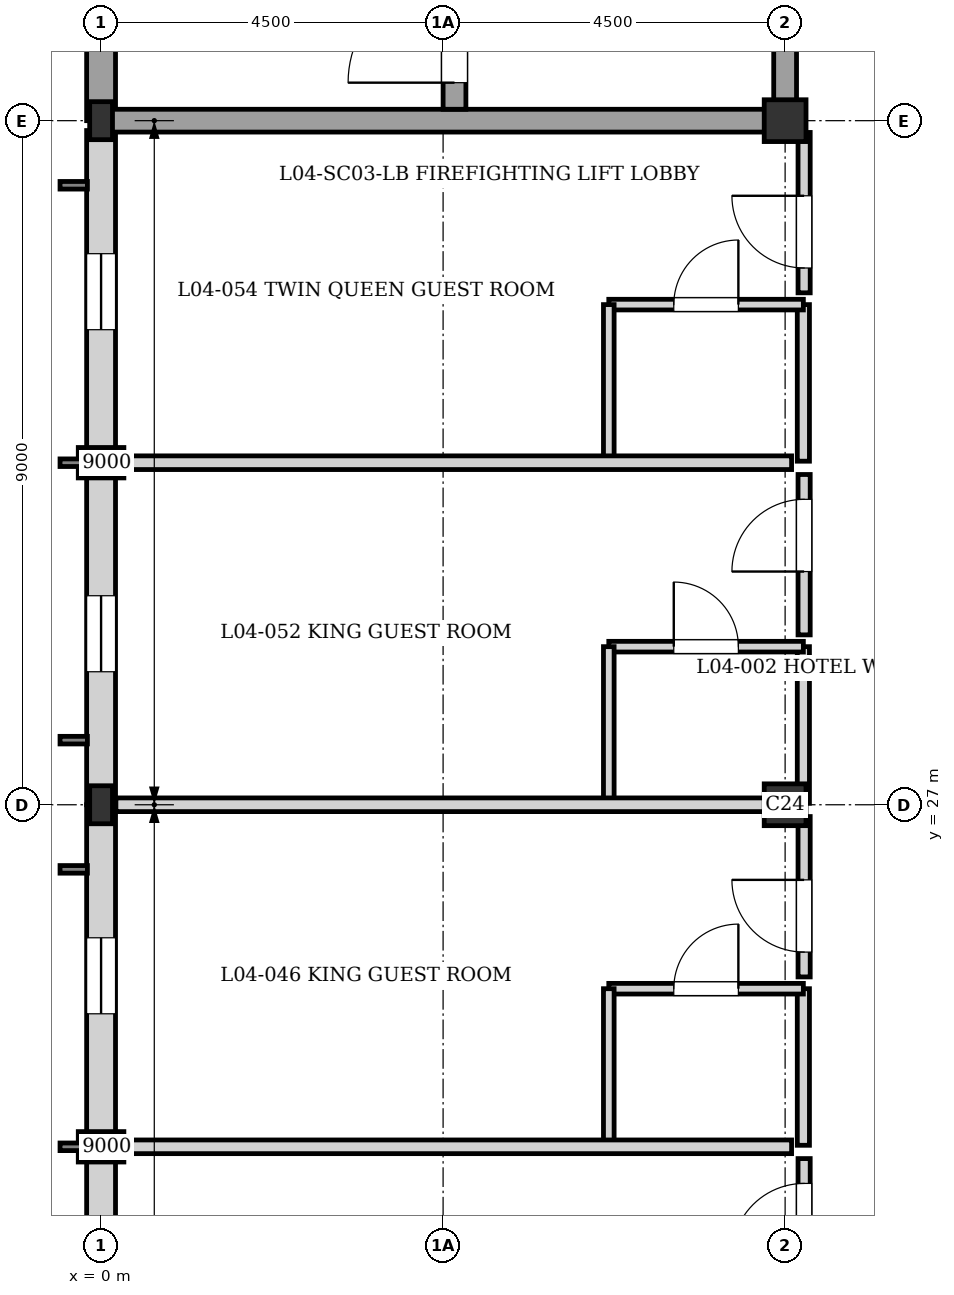
"""IFC4 building model, lengths in metres.
Left out: names, types, materials, properties, quantities, classifications, styles, units other than length and angle.
Written with IfcOpenShell. Run it as: python <this file> out.ifc"""

import sys

from ifc_helpers import new_model, si_unit, direction, frame, frame_2d, origin, origin_2d, place, context, subcontext, project, spatial, rectangle, i_section, extrude, element, fill, save


model = new_model("IFC4")
c1 = context("Model", 3, precision=1e-05, world=origin(), true_north=direction((0.0, 1.0)))
c2 = subcontext(c1, "Body", "Model", "MODEL_VIEW")
j1 = project(units=[si_unit("LENGTHUNIT", "METRE"), si_unit("PLANEANGLEUNIT", "RADIAN")], contexts=[c1])
p1 = place(None, origin())
s1 = spatial("IfcSite", under=j1, at=p1, CompositionType="ELEMENT")
p2 = place(p1, origin())
s2 = spatial("IfcBuilding", under=s1, at=p2, CompositionType="ELEMENT")
p3 = place(p2, frame((0.0, 0.0, 14.56)))
s3 = spatial("IfcBuildingStorey", under=s2, at=p3, CompositionType="ELEMENT", Elevation=14.56)
for number, where, z_axis, x_axis in (
    (1, (0.0, 27.0, 0.0), (0.0, 0.0, 1.0), (1.0, 0.0, 0.0)),
    (2, (0.0, 36.0, 0.0), (0.0, 0.0, 1.0), (1.0, 0.0, 0.0)),
):
    element("IfcColumn", number, at=place(p3, frame(where, z_axis=z_axis, x_axis=x_axis)), inside=s3, PredefinedType="COLUMN", context=c2, shape_type="SweptSolid", body=[
        extrude(i_section(OverallWidth=0.3, OverallDepth=0.5, WebThickness=0.014, FlangeThickness=0.028, at=origin_2d()), origin(), (0.0, 0.0, 1.0), 3.04),
    ])
for number, where, z_axis, x_axis in (
    (3, (9.0, 27.0, 0.0), (0.0, 0.0, 1.0), (1.0, 0.0, 0.0)),
    (4, (9.0, 36.0, 0.0), (0.0, 0.0, 1.0), (1.0, 0.0, 0.0)),
):
    element("IfcColumn", number, at=place(p3, frame(where, z_axis=z_axis, x_axis=x_axis)), inside=s3, PredefinedType="COLUMN", context=c2, shape_type="SweptSolid", body=[
        extrude(rectangle(XDim=0.55, YDim=0.55, at=origin_2d()), origin(), (0.0, 0.0, 1.0), 3.04),
    ])
for number, where, z_axis, x_axis in (
    (5, (0.0, 22.5, 0.0), (0.0, 0.0, 1.0), (0.0, 1.0, 0.0)),
    (6, (0.0, 31.5, 0.0), (0.0, 0.0, 1.0), (0.0, 1.0, 0.0)),
):
    element("IfcColumn", number, at=place(p3, frame(where, z_axis=z_axis, x_axis=x_axis)), inside=s3, PredefinedType="PILASTER", context=c2, shape_type="SweptSolid", body=[
        extrude(rectangle(XDim=0.4, YDim=0.6, at=origin_2d()), origin(), (0.0, 0.0, 1.0), 3.04),
    ])
p4 = place(p3, frame((0.0, 18.0, 0.0), z_axis=(0.0, 0.0, 1.0), x_axis=(0.0, 1.0, 0.0)))
e7 = element("IfcWall", 7, at=p4, inside=s3, PredefinedType="SOLIDWALL", context=c2, shape_type="SweptSolid", body=[
    extrude(rectangle(XDim=9.0, YDim=0.38, at=frame_2d((4.5, 0.0))), origin(), (0.0, 0.0, 1.0), 2.48),
])
p5 = place(p4, frame((1.75, 0.0, 0.35)))
e8 = element("IfcOpeningElement", 8, at=p5, cuts=e7, PredefinedType="OPENING", context=c2, shape_type="SweptSolid", body=[
    extrude(rectangle(XDim=1.0, YDim=1.6, at=frame_2d((0.5, 0.8))), frame((0.0, 0.2, 0.0), z_axis=(0.0, -1.0, 0.0), x_axis=(1.0, 0.0, 0.0)), (0.0, 0.0, 1.0), 0.4),
])
p6 = place(p4, frame((6.25, 0.0, 0.35)))
e9 = element("IfcOpeningElement", 9, at=p6, cuts=e7, PredefinedType="OPENING", context=c2, shape_type="SweptSolid", body=[
    extrude(rectangle(XDim=1.0, YDim=1.6, at=frame_2d((0.5, 0.8))), frame((0.0, 0.2, 0.0), z_axis=(0.0, -1.0, 0.0), x_axis=(1.0, 0.0, 0.0)), (0.0, 0.0, 1.0), 0.4),
])
p7 = place(p3, frame((0.0, 27.0, 0.0), z_axis=(0.0, 0.0, 1.0), x_axis=(0.0, 1.0, 0.0)))
e10 = element("IfcWall", 10, at=p7, inside=s3, PredefinedType="SOLIDWALL", context=c2, shape_type="SweptSolid", body=[
    extrude(rectangle(XDim=8.87, YDim=0.38, at=frame_2d((4.435, 0.0))), origin(), (0.0, 0.0, 1.0), 2.42),
])
p8 = place(p7, frame((1.75, 0.0, 0.35)))
e11 = element("IfcOpeningElement", 11, at=p8, cuts=e10, PredefinedType="OPENING", context=c2, shape_type="SweptSolid", body=[
    extrude(rectangle(XDim=1.0, YDim=1.6, at=frame_2d((0.5, 0.8))), frame((0.0, 0.2, 0.0), z_axis=(0.0, -1.0, 0.0), x_axis=(1.0, 0.0, 0.0)), (0.0, 0.0, 1.0), 0.4),
])
p9 = place(p7, frame((6.25, 0.0, 0.35)))
e12 = element("IfcOpeningElement", 12, at=p9, cuts=e10, PredefinedType="OPENING", context=c2, shape_type="SweptSolid", body=[
    extrude(rectangle(XDim=1.0, YDim=1.6, at=frame_2d((0.5, 0.8))), frame((0.0, 0.2, 0.0), z_axis=(0.0, -1.0, 0.0), x_axis=(1.0, 0.0, 0.0)), (0.0, 0.0, 1.0), 0.4),
])
p10 = place(p3, frame((0.0, 36.0, 0.0), z_axis=(0.0, 0.0, 1.0), x_axis=(0.0, 1.0, 0.0)))
e13 = element("IfcWall", 13, at=p10, inside=s3, PredefinedType="SOLIDWALL", context=c2, shape_type="SweptSolid", body=[
    extrude(rectangle(XDim=9.0, YDim=0.38, at=frame_2d((4.5, 0.0))), origin(), (0.0, 0.0, 1.0), 2.82),
])
p11 = place(p3, frame((0.0, 36.0, 0.0), z_axis=(0.0, 0.0, 1.0), x_axis=(1.0, 0.0, 0.0)))
e14 = element("IfcWall", 14, at=p11, inside=s3, PredefinedType="SHEAR", context=c2, shape_type="SweptSolid", body=[
    extrude(rectangle(XDim=9.0, YDim=0.3, at=frame_2d((4.5, 0.0))), origin(), (0.0, 0.0, 1.0), 2.82),
])
p12 = place(p3, frame((9.0, 36.0, 0.0), z_axis=(0.0, 0.0, 1.0), x_axis=(0.0, 1.0, 0.0)))
e15 = element("IfcWall", 15, at=p12, inside=s3, PredefinedType="SHEAR", context=c2, shape_type="SweptSolid", body=[
    extrude(rectangle(XDim=9.0, YDim=0.3, at=frame_2d((4.5, 0.0))), origin(), (0.0, 0.0, 1.0), 2.82),
])
p13 = place(p12, frame((2.05, 0.0, 0.0)))
e16 = element("IfcOpeningElement", 16, at=p13, cuts=e15, PredefinedType="OPENING", context=c2, shape_type="SweptSolid", body=[
    extrude(rectangle(XDim=1.4, YDim=2.02, at=frame_2d((0.7, 1.01))), frame((0.0, 0.16, 0.0), z_axis=(0.0, -1.0, 0.0), x_axis=(1.0, 0.0, 0.0)), (0.0, 0.0, 1.0), 0.32),
])
p14 = place(p3, frame((4.65, 36.15, 0.0), z_axis=(0.0, 0.0, 1.0), x_axis=(0.0, 1.0, 0.0)))
e17 = element("IfcWall", 17, at=p14, inside=s3, PredefinedType="SHEAR", context=c2, shape_type="SweptSolid", body=[
    extrude(rectangle(XDim=8.7, YDim=0.3, at=frame_2d((4.35, 0.0))), origin(), (0.0, 0.0, 1.0), 2.82),
])
p15 = place(p14, frame((0.35, 0.0, 0.0)))
e18 = element("IfcOpeningElement", 18, at=p15, cuts=e17, PredefinedType="OPENING", context=c2, shape_type="SweptSolid", body=[
    extrude(rectangle(XDim=1.4, YDim=2.02, at=frame_2d((0.7, 1.01))), frame((0.0, 0.16, 0.0), z_axis=(0.0, -1.0, 0.0), x_axis=(1.0, 0.0, 0.0)), (0.0, 0.0, 1.0), 0.32),
])
p16 = place(p3, frame((9.24, 22.52, 0.0), z_axis=(0.0, 0.0, 1.0), x_axis=(0.0, 1.0, 0.0)))
e19 = element("IfcWall", 19, at=p16, inside=s3, PredefinedType="PARTITIONING", context=c2, shape_type="SweptSolid", body=[
    extrude(rectangle(XDim=2.06, YDim=0.16, at=frame_2d((1.03, 0.0))), origin(), (0.0, 0.0, 1.0), 2.82),
])
p17 = place(p3, frame((6.68, 24.58, 0.0), z_axis=(0.0, 0.0, 1.0), x_axis=(1.0, 0.0, 0.0)))
e20 = element("IfcWall", 20, at=p17, inside=s3, PredefinedType="PLUMBINGWALL", context=c2, shape_type="SweptSolid", body=[
    extrude(rectangle(XDim=2.56, YDim=0.14, at=frame_2d((1.28, 0.0))), origin(), (0.0, 0.0, 1.0), 2.82),
])
p18 = place(p17, frame((0.855, 0.0, 0.0)))
e21 = element("IfcOpeningElement", 21, at=p18, cuts=e20, PredefinedType="OPENING", context=c2, shape_type="SweptSolid", body=[
    extrude(rectangle(XDim=0.85, YDim=2.04, at=frame_2d((0.425, 1.02))), frame((0.0, 0.08, 0.0), z_axis=(0.0, -1.0, 0.0), x_axis=(1.0, 0.0, 0.0)), (0.0, 0.0, 1.0), 0.16),
])
p19 = place(p3, frame((6.68, 22.52, 0.0), z_axis=(0.0, 0.0, 1.0), x_axis=(0.0, 1.0, 0.0)))
e22 = element("IfcWall", 22, at=p19, inside=s3, PredefinedType="PLUMBINGWALL", context=c2, shape_type="SweptSolid", body=[
    extrude(rectangle(XDim=2.06, YDim=0.14, at=frame_2d((1.03, 0.0))), origin(), (0.0, 0.0, 1.0), 2.82),
])
p20 = place(p3, frame((9.24, 27.02, 0.0), z_axis=(0.0, 0.0, 1.0), x_axis=(0.0, 1.0, 0.0)))
e23 = element("IfcWall", 23, at=p20, inside=s3, PredefinedType="PARTITIONING", context=c2, shape_type="SweptSolid", body=[
    extrude(rectangle(XDim=2.06, YDim=0.16, at=frame_2d((1.03, 0.0))), origin(), (0.0, 0.0, 1.0), 2.82),
])
p21 = place(p3, frame((6.68, 29.08, 0.0), z_axis=(0.0, 0.0, 1.0), x_axis=(1.0, 0.0, 0.0)))
e24 = element("IfcWall", 24, at=p21, inside=s3, PredefinedType="PLUMBINGWALL", context=c2, shape_type="SweptSolid", body=[
    extrude(rectangle(XDim=2.56, YDim=0.14, at=frame_2d((1.28, 0.0))), origin(), (0.0, 0.0, 1.0), 2.82),
])
p22 = place(p21, frame((0.855, 0.0, 0.0)))
e25 = element("IfcOpeningElement", 25, at=p22, cuts=e24, PredefinedType="OPENING", context=c2, shape_type="SweptSolid", body=[
    extrude(rectangle(XDim=0.85, YDim=2.04, at=frame_2d((0.425, 1.02))), frame((0.0, 0.08, 0.0), z_axis=(0.0, -1.0, 0.0), x_axis=(1.0, 0.0, 0.0)), (0.0, 0.0, 1.0), 0.16),
])
p23 = place(p3, frame((6.68, 27.02, 0.0), z_axis=(0.0, 0.0, 1.0), x_axis=(0.0, 1.0, 0.0)))
e26 = element("IfcWall", 26, at=p23, inside=s3, PredefinedType="PLUMBINGWALL", context=c2, shape_type="SweptSolid", body=[
    extrude(rectangle(XDim=2.06, YDim=0.14, at=frame_2d((1.03, 0.0))), origin(), (0.0, 0.0, 1.0), 2.82),
])
p24 = place(p3, frame((9.24, 31.52, 0.0), z_axis=(0.0, 0.0, 1.0), x_axis=(0.0, 1.0, 0.0)))
e27 = element("IfcWall", 27, at=p24, inside=s3, PredefinedType="PARTITIONING", context=c2, shape_type="SweptSolid", body=[
    extrude(rectangle(XDim=2.06, YDim=0.16, at=frame_2d((1.03, 0.0))), origin(), (0.0, 0.0, 1.0), 2.82),
])
p25 = place(p3, frame((6.68, 33.58, 0.0), z_axis=(0.0, 0.0, 1.0), x_axis=(1.0, 0.0, 0.0)))
e28 = element("IfcWall", 28, at=p25, inside=s3, PredefinedType="PLUMBINGWALL", context=c2, shape_type="SweptSolid", body=[
    extrude(rectangle(XDim=2.56, YDim=0.14, at=frame_2d((1.28, 0.0))), origin(), (0.0, 0.0, 1.0), 2.82),
])
p26 = place(p25, frame((0.855, 0.0, 0.0)))
e29 = element("IfcOpeningElement", 29, at=p26, cuts=e28, PredefinedType="OPENING", context=c2, shape_type="SweptSolid", body=[
    extrude(rectangle(XDim=0.85, YDim=2.04, at=frame_2d((0.425, 1.02))), frame((0.0, 0.08, 0.0), z_axis=(0.0, -1.0, 0.0), x_axis=(1.0, 0.0, 0.0)), (0.0, 0.0, 1.0), 0.16),
])
p27 = place(p3, frame((6.68, 31.52, 0.0), z_axis=(0.0, 0.0, 1.0), x_axis=(0.0, 1.0, 0.0)))
e30 = element("IfcWall", 30, at=p27, inside=s3, PredefinedType="PLUMBINGWALL", context=c2, shape_type="SweptSolid", body=[
    extrude(rectangle(XDim=2.06, YDim=0.14, at=frame_2d((1.03, 0.0))), origin(), (0.0, 0.0, 1.0), 2.82),
])
p28 = place(p3, frame((0.195, 22.5, 0.0), z_axis=(0.0, 0.0, 1.0), x_axis=(1.0, 0.0, 0.0)))
e31 = element("IfcWall", 31, at=p28, inside=s3, PredefinedType="PARTITIONING", context=c2, shape_type="SweptSolid", body=[
    extrude(rectangle(XDim=8.89, YDim=0.18, at=frame_2d((4.445, 0.0))), origin(), (0.0, 0.0, 1.0), 2.82),
])
p29 = place(p3, frame((0.195, 27.0, 0.0), z_axis=(0.0, 0.0, 1.0), x_axis=(1.0, 0.0, 0.0)))
e32 = element("IfcWall", 32, at=p29, inside=s3, PredefinedType="PARTITIONING", context=c2, shape_type="SweptSolid", body=[
    extrude(rectangle(XDim=8.89, YDim=0.18, at=frame_2d((4.445, 0.0))), origin(), (0.0, 0.0, 1.0), 2.39),
])
p30 = place(p3, frame((0.195, 31.5, 0.0), z_axis=(0.0, 0.0, 1.0), x_axis=(1.0, 0.0, 0.0)))
e33 = element("IfcWall", 33, at=p30, inside=s3, PredefinedType="PARTITIONING", context=c2, shape_type="SweptSolid", body=[
    extrude(rectangle(XDim=8.89, YDim=0.18, at=frame_2d((4.445, 0.0))), origin(), (0.0, 0.0, 1.0), 2.82),
])
p31 = place(p3, frame((9.25, 20.235, 0.0), z_axis=(0.0, 0.0, 1.0), x_axis=(0.0, 1.0, 0.0)))
e34 = element("IfcWall", 34, at=p31, inside=s3, PredefinedType="PARTITIONING", context=c2, shape_type="SweptSolid", body=[
    extrude(rectangle(XDim=2.11, YDim=0.16, at=frame_2d((1.055, 0.0))), origin(), (0.0, 0.0, 1.0), 2.82),
])
p32 = place(p31, frame((0.833, 0.0, 0.0)))
e35 = element("IfcOpeningElement", 35, at=p32, cuts=e34, PredefinedType="OPENING", context=c2, shape_type="SweptSolid", body=[
    extrude(rectangle(XDim=0.95, YDim=2.15, at=frame_2d((0.475, 1.075))), frame((0.0, 0.09, 0.0), z_axis=(0.0, -1.0, 0.0), x_axis=(1.0, 0.0, 0.0)), (0.0, 0.0, 1.0), 0.18),
])
p33 = place(p3, frame((9.25, 24.735, 0.0), z_axis=(0.0, 0.0, 1.0), x_axis=(0.0, 1.0, 0.0)))
e36 = element("IfcWall", 36, at=p33, inside=s3, PredefinedType="PARTITIONING", context=c2, shape_type="SweptSolid", body=[
    extrude(rectangle(XDim=2.11, YDim=0.16, at=frame_2d((1.055, 0.0))), origin(), (0.0, 0.0, 1.0), 2.82),
])
p34 = place(p33, frame((0.327, 0.0, 0.0)))
e37 = element("IfcOpeningElement", 37, at=p34, cuts=e36, PredefinedType="OPENING", context=c2, shape_type="SweptSolid", body=[
    extrude(rectangle(XDim=0.95, YDim=2.15, at=frame_2d((0.475, 1.075))), frame((0.0, 0.09, 0.0), z_axis=(0.0, -1.0, 0.0), x_axis=(1.0, 0.0, 0.0)), (0.0, 0.0, 1.0), 0.18),
])
p35 = place(p3, frame((9.25, 29.235, 0.0), z_axis=(0.0, 0.0, 1.0), x_axis=(0.0, 1.0, 0.0)))
e38 = element("IfcWall", 38, at=p35, inside=s3, PredefinedType="PARTITIONING", context=c2, shape_type="SweptSolid", body=[
    extrude(rectangle(XDim=2.11, YDim=0.16, at=frame_2d((1.055, 0.0))), origin(), (0.0, 0.0, 1.0), 2.82),
])
p36 = place(p35, frame((0.833, 0.0, 0.0)))
e39 = element("IfcOpeningElement", 39, at=p36, cuts=e38, PredefinedType="OPENING", context=c2, shape_type="SweptSolid", body=[
    extrude(rectangle(XDim=0.95, YDim=2.15, at=frame_2d((0.475, 1.075))), frame((0.0, 0.09, 0.0), z_axis=(0.0, -1.0, 0.0), x_axis=(1.0, 0.0, 0.0)), (0.0, 0.0, 1.0), 0.18),
])
p37 = place(p3, frame((9.25, 33.735, 0.0), z_axis=(0.0, 0.0, 1.0), x_axis=(0.0, 1.0, 0.0)))
e40 = element("IfcWall", 40, at=p37, inside=s3, PredefinedType="PARTITIONING", context=c2, shape_type="SweptSolid", body=[
    extrude(rectangle(XDim=2.11, YDim=0.16, at=frame_2d((1.055, 0.0))), origin(), (0.0, 0.0, 1.0), 2.82),
])
p38 = place(p37, frame((0.327, 0.0, 0.0)))
e41 = element("IfcOpeningElement", 41, at=p38, cuts=e40, PredefinedType="OPENING", context=c2, shape_type="SweptSolid", body=[
    extrude(rectangle(XDim=0.95, YDim=2.15, at=frame_2d((0.475, 1.075))), frame((0.0, 0.09, 0.0), z_axis=(0.0, -1.0, 0.0), x_axis=(1.0, 0.0, 0.0)), (0.0, 0.0, 1.0), 0.18),
])
p39 = place(p6, origin())
e42 = element("IfcWindow", 42, at=p39, inside=s3, PartitioningType="SINGLE_PANEL", PredefinedType="WINDOW", context=c2, shape_type="SweptSolid", body=[
    extrude(rectangle(XDim=1.0, YDim=1.6, at=frame_2d((0.5, 0.8))), frame((0.0, 0.03, 0.0), z_axis=(0.0, -1.0, 0.0), x_axis=(1.0, 0.0, 0.0)), (0.0, 0.0, 1.0), 0.06),
])
fill(e9, e42)
p40 = place(p8, origin())
e43 = element("IfcWindow", 43, at=p40, inside=s3, PartitioningType="SINGLE_PANEL", PredefinedType="WINDOW", context=c2, shape_type="SweptSolid", body=[
    extrude(rectangle(XDim=1.0, YDim=1.6, at=frame_2d((0.5, 0.8))), frame((0.0, 0.03, 0.0), z_axis=(0.0, -1.0, 0.0), x_axis=(1.0, 0.0, 0.0)), (0.0, 0.0, 1.0), 0.06),
])
fill(e11, e43)
p41 = place(p9, origin())
e44 = element("IfcWindow", 44, at=p41, inside=s3, PartitioningType="SINGLE_PANEL", PredefinedType="WINDOW", context=c2, shape_type="SweptSolid", body=[
    extrude(rectangle(XDim=1.0, YDim=1.6, at=frame_2d((0.5, 0.8))), frame((0.0, 0.03, 0.0), z_axis=(0.0, -1.0, 0.0), x_axis=(1.0, 0.0, 0.0)), (0.0, 0.0, 1.0), 0.06),
])
fill(e12, e44)
p42 = place(p15, origin())
e45 = element("IfcDoor", 45, at=p42, inside=s3, OperationType="SINGLE_SWING_LEFT", PredefinedType="DOOR", context=c2, shape_type="SweptSolid", body=[
    extrude(rectangle(XDim=1.4, YDim=2.02, at=frame_2d((0.7, 1.01))), frame((0.0, 0.025, 0.0), z_axis=(0.0, -1.0, 0.0), x_axis=(1.0, 0.0, 0.0)), (0.0, 0.0, 1.0), 0.05),
])
fill(e18, e45)
p43 = place(p18, origin())
e46 = element("IfcDoor", 46, at=p43, inside=s3, OperationType="SINGLE_SWING_RIGHT", PredefinedType="DOOR", context=c2, shape_type="SweptSolid", body=[
    extrude(rectangle(XDim=0.85, YDim=2.04, at=frame_2d((0.425, 1.02))), frame((0.0, 0.025, 0.0), z_axis=(0.0, -1.0, 0.0), x_axis=(1.0, 0.0, 0.0)), (0.0, 0.0, 1.0), 0.05),
])
fill(e21, e46)
p44 = place(p22, origin())
e47 = element("IfcDoor", 47, at=p44, inside=s3, OperationType="SINGLE_SWING_LEFT", PredefinedType="DOOR", context=c2, shape_type="SweptSolid", body=[
    extrude(rectangle(XDim=0.85, YDim=2.04, at=frame_2d((0.425, 1.02))), frame((0.0, 0.025, 0.0), z_axis=(0.0, -1.0, 0.0), x_axis=(1.0, 0.0, 0.0)), (0.0, 0.0, 1.0), 0.05),
])
fill(e25, e47)
p45 = place(p26, origin())
e48 = element("IfcDoor", 48, at=p45, inside=s3, OperationType="SINGLE_SWING_RIGHT", PredefinedType="DOOR", context=c2, shape_type="SweptSolid", body=[
    extrude(rectangle(XDim=0.85, YDim=2.04, at=frame_2d((0.425, 1.02))), frame((0.0, 0.025, 0.0), z_axis=(0.0, -1.0, 0.0), x_axis=(1.0, 0.0, 0.0)), (0.0, 0.0, 1.0), 0.05),
])
fill(e29, e48)
p46 = place(p32, origin())
e49 = element("IfcDoor", 49, at=p46, inside=s3, OperationType="SINGLE_SWING_LEFT", PredefinedType="DOOR", context=c2, shape_type="SweptSolid", body=[
    extrude(rectangle(XDim=0.95, YDim=2.15, at=frame_2d((0.475, 1.075))), frame((0.0, 0.025, 0.0), z_axis=(0.0, -1.0, 0.0), x_axis=(1.0, 0.0, 0.0)), (0.0, 0.0, 1.0), 0.05),
])
fill(e35, e49)
p47 = place(p34, origin())
e50 = element("IfcDoor", 50, at=p47, inside=s3, OperationType="SINGLE_SWING_RIGHT", PredefinedType="DOOR", context=c2, shape_type="SweptSolid", body=[
    extrude(rectangle(XDim=0.95, YDim=2.15, at=frame_2d((0.475, 1.075))), frame((0.0, 0.025, 0.0), z_axis=(0.0, -1.0, 0.0), x_axis=(1.0, 0.0, 0.0)), (0.0, 0.0, 1.0), 0.05),
])
fill(e37, e50)
p48 = place(p36, origin())
e51 = element("IfcDoor", 51, at=p48, inside=s3, OperationType="SINGLE_SWING_LEFT", PredefinedType="DOOR", context=c2, shape_type="SweptSolid", body=[
    extrude(rectangle(XDim=0.95, YDim=2.15, at=frame_2d((0.475, 1.075))), frame((0.0, 0.025, 0.0), z_axis=(0.0, -1.0, 0.0), x_axis=(1.0, 0.0, 0.0)), (0.0, 0.0, 1.0), 0.05),
])
fill(e39, e51)
p49 = place(p38, origin())
e52 = element("IfcDoor", 52, at=p49, inside=s3, OperationType="SINGLE_SWING_RIGHT", PredefinedType="DOOR", context=c2, shape_type="SweptSolid", body=[
    extrude(rectangle(XDim=0.95, YDim=2.15, at=frame_2d((0.475, 1.075))), frame((0.0, 0.025, 0.0), z_axis=(0.0, -1.0, 0.0), x_axis=(1.0, 0.0, 0.0)), (0.0, 0.0, 1.0), 0.05),
])
fill(e41, e52)
save(model, sys.argv[1])
